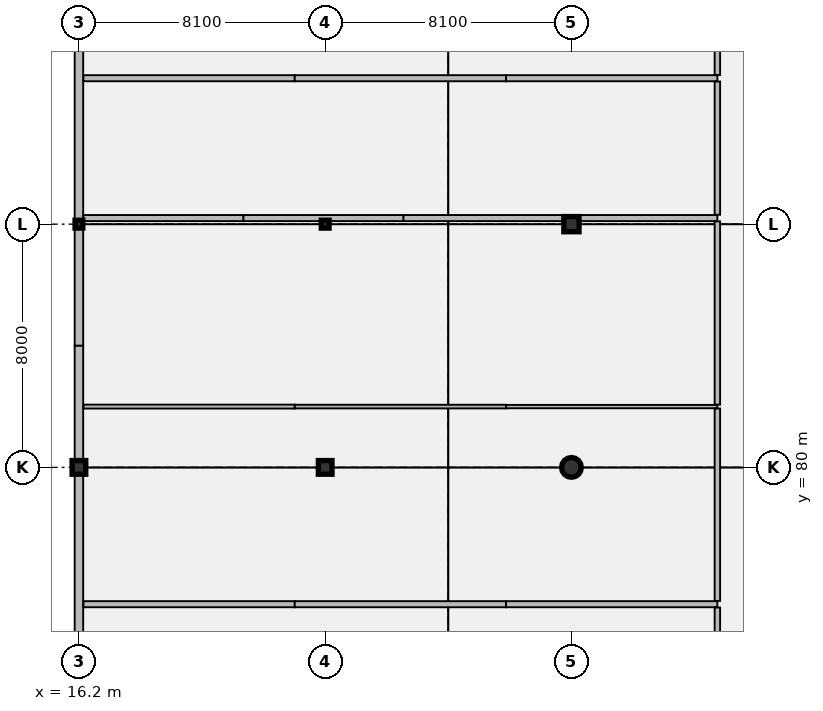
"""IFC4 building model, lengths in metres.
Left out: names, types, materials, properties, quantities, classifications, styles, units other than length and angle.
Written with IfcOpenShell. Run it as: python <this file> out.ifc"""

import sys

from ifc_helpers import new_model, si_unit, direction, frame, frame_2d, origin, origin_2d, place, context, subcontext, project, spatial, rectangle, circle, i_section, extrude, element, fill, save


model = new_model("IFC4")
c1 = context("Model", 3, precision=1e-05, world=origin(), true_north=direction((0.0, 1.0)))
c2 = subcontext(c1, "Body", "Model", "MODEL_VIEW")
j1 = project(units=[si_unit("LENGTHUNIT", "METRE"), si_unit("PLANEANGLEUNIT", "RADIAN")], contexts=[c1])
p1 = place(None, origin())
s1 = spatial("IfcSite", under=j1, at=p1, CompositionType="ELEMENT")
p2 = place(p1, origin())
s2 = spatial("IfcBuilding", under=s1, at=p2, CompositionType="ELEMENT")
p3 = place(p2, frame((0.0, 0.0, 33.3)))
s3 = spatial("IfcBuildingStorey", under=s2, at=p3, CompositionType="ELEMENT", Elevation=33.3)
p4 = place(p3, frame((16.2, 80.0, 0.0), z_axis=(0.0, 0.0, 1.0), x_axis=(1.0, 0.0, 0.0)))
e1 = element("IfcColumn", 1, at=p4, inside=s3, PredefinedType="COLUMN", context=c2, shape_type="SweptSolid", body=[
    extrude(rectangle(XDim=0.45, YDim=0.45, at=origin_2d()), origin(), (0.0, 0.0, 1.0), 3.98),
])
p5 = place(p3, frame((16.2, 88.0, 0.0), z_axis=(0.0, 0.0, 1.0), x_axis=(1.0, 0.0, 0.0)))
e2 = element("IfcColumn", 2, at=p5, inside=s3, PredefinedType="COLUMN", context=c2, shape_type="SweptSolid", body=[
    extrude(i_section(OverallWidth=0.256, OverallDepth=0.26, WebThickness=0.011, FlangeThickness=0.017, FilletRadius=0.013, at=origin_2d()), origin(), (0.0, 0.0, 1.0), 3.98),
])
p6 = place(p3, frame((24.3, 80.0, 0.0), z_axis=(0.0, 0.0, 1.0), x_axis=(1.0, 0.0, 0.0)))
e3 = element("IfcColumn", 3, at=p6, inside=s3, PredefinedType="COLUMN", context=c2, shape_type="SweptSolid", body=[
    extrude(rectangle(XDim=0.45, YDim=0.45, at=origin_2d()), origin(), (0.0, 0.0, 1.0), 3.98),
])
p7 = place(p3, frame((24.3, 88.0, 0.0), z_axis=(0.0, 0.0, 1.0), x_axis=(1.0, 0.0, 0.0)))
e4 = element("IfcColumn", 4, at=p7, inside=s3, PredefinedType="COLUMN", context=c2, shape_type="SweptSolid", body=[
    extrude(i_section(OverallWidth=0.256, OverallDepth=0.26, WebThickness=0.011, FlangeThickness=0.017, FilletRadius=0.013, at=origin_2d()), origin(), (0.0, 0.0, 1.0), 3.98),
])
p8 = place(p3, frame((32.4, 80.0, 0.0), z_axis=(0.0, 0.0, 1.0), x_axis=(1.0, 0.0, 0.0)))
e5 = element("IfcColumn", 5, at=p8, inside=s3, PredefinedType="COLUMN", context=c2, shape_type="SweptSolid", body=[
    extrude(circle(Radius=0.325, at=origin_2d()), origin(), (0.0, 0.0, 1.0), 3.98),
])
p9 = place(p3, frame((32.4, 88.0, 0.0), z_axis=(0.0, 0.0, 1.0), x_axis=(1.0, 0.0, 0.0)))
e6 = element("IfcColumn", 6, at=p9, inside=s3, PredefinedType="COLUMN", context=c2, shape_type="SweptSolid", body=[
    extrude(rectangle(XDim=0.5, YDim=0.5, at=origin_2d()), origin(), (0.0, 0.0, 1.0), 3.98),
])
p10 = place(p3, frame((16.2, 98.0, 0.0), z_axis=(0.0, 0.0, 1.0), x_axis=(0.0, -1.0, 0.0)))
e7 = element("IfcWall", 7, at=p10, inside=s3, PredefinedType="SOLIDWALL", context=c2, shape_type="SweptSolid", body=[
    extrude(rectangle(XDim=14.0, YDim=0.28, at=frame_2d((7.0, 0.0))), origin(), (0.0, 0.0, 1.0), 3.655),
])
p11 = place(p10, frame((6.3, 0.0, 0.95)))
e8 = element("IfcOpeningElement", 8, at=p11, cuts=e7, PredefinedType="OPENING", context=c2, shape_type="SweptSolid", body=[
    extrude(rectangle(XDim=1.8, YDim=1.5, at=frame_2d((0.9, 0.75))), frame((0.0, 0.15, 0.0), z_axis=(0.0, -1.0, 0.0), x_axis=(1.0, 0.0, 0.0)), (0.0, 0.0, 1.0), 0.3),
])
p12 = place(p3, frame((16.2, 84.0, 0.0), z_axis=(0.0, 0.0, 1.0), x_axis=(0.0, -1.0, 0.0)))
e9 = element("IfcWall", 9, at=p12, inside=s3, PredefinedType="SOLIDWALL", context=c2, shape_type="SweptSolid", body=[
    extrude(rectangle(XDim=14.0, YDim=0.28, at=frame_2d((7.0, 0.0))), origin(), (0.0, 0.0, 1.0), 3.655),
])
for number, where, z_axis, x_axis in (
    (10, (16.348, 75.5, 0.0), (0.0, 0.0, 1.0), (1.0, 0.0, 0.0)),
    (11, (23.299, 75.5, 0.0), (0.0, 0.0, 1.0), (1.0, 0.0, 0.0)),
    (12, (30.249, 75.5, 0.0), (0.0, 0.0, 1.0), (1.0, 0.0, 0.0)),
):
    element("IfcWall", number, at=place(p3, frame(where, z_axis=z_axis, x_axis=x_axis)), inside=s3, PredefinedType="PARTITIONING", context=c2, shape_type="SweptSolid", body=[
        extrude(rectangle(XDim=6.951, YDim=0.2, at=frame_2d((3.475, 0.0))), origin(), (0.0, 0.0, 1.0), 3.98),
    ])
p13 = place(p3, frame((16.348, 82.0, 0.0), z_axis=(0.0, 0.0, 1.0), x_axis=(1.0, 0.0, 0.0)))
e13 = element("IfcWall", 13, at=p13, inside=s3, PredefinedType="PARTITIONING", context=c2, shape_type="SweptSolid", body=[
    extrude(rectangle(XDim=6.951, YDim=0.13, at=frame_2d((3.475, 0.0))), origin(), (0.0, 0.0, 1.0), 3.98),
])
p14 = place(p3, frame((23.299, 82.0, 0.0), z_axis=(0.0, 0.0, 1.0), x_axis=(1.0, 0.0, 0.0)))
e14 = element("IfcWall", 14, at=p14, inside=s3, PredefinedType="PARTITIONING", context=c2, shape_type="SweptSolid", body=[
    extrude(rectangle(XDim=6.951, YDim=0.12, at=frame_2d((3.475, 0.0))), origin(), (0.0, 0.0, 1.0), 3.98),
])
p15 = place(p3, frame((30.249, 82.0, 0.0), z_axis=(0.0, 0.0, 1.0), x_axis=(1.0, 0.0, 0.0)))
e15 = element("IfcWall", 15, at=p15, inside=s3, PredefinedType="PARTITIONING", context=c2, shape_type="SweptSolid", body=[
    extrude(rectangle(XDim=6.951, YDim=0.11, at=frame_2d((3.475, 0.0))), origin(), (0.0, 0.0, 1.0), 3.98),
])
p16 = place(p3, frame((16.348, 88.2, 0.0), z_axis=(0.0, 0.0, 1.0), x_axis=(1.0, 0.0, 0.0)))
e16 = element("IfcWall", 16, at=p16, inside=s3, PredefinedType="PARTITIONING", context=c2, shape_type="SweptSolid", body=[
    extrude(rectangle(XDim=5.265, YDim=0.2, at=frame_2d((2.632, 0.0))), origin(), (0.0, 0.0, 1.0), 3.655),
])
p17 = place(p3, frame((21.613, 88.2, 0.0), z_axis=(0.0, 0.0, 1.0), x_axis=(1.0, 0.0, 0.0)))
e17 = element("IfcWall", 17, at=p17, inside=s3, PredefinedType="PARTITIONING", context=c2, shape_type="SweptSolid", body=[
    extrude(rectangle(XDim=5.265, YDim=0.2, at=frame_2d((2.632, 0.0))), origin(), (0.0, 0.0, 1.0), 3.655),
])
p18 = place(p3, frame((26.877, 88.2, 0.0), z_axis=(0.0, 0.0, 1.0), x_axis=(1.0, 0.0, 0.0)))
e18 = element("IfcWall", 18, at=p18, inside=s3, PredefinedType="PARTITIONING", context=c2, shape_type="SweptSolid", body=[
    extrude(rectangle(XDim=5.265, YDim=0.2, at=frame_2d((2.632, 0.0))), origin(), (0.0, 0.0, 1.0), 3.655),
])
p19 = place(p3, frame((32.658, 88.2, 0.0), z_axis=(0.0, 0.0, 1.0), x_axis=(1.0, 0.0, 0.0)))
e19 = element("IfcWall", 19, at=p19, inside=s3, PredefinedType="PARTITIONING", context=c2, shape_type="SweptSolid", body=[
    extrude(rectangle(XDim=4.542, YDim=0.2, at=frame_2d((2.271, 0.0))), origin(), (0.0, 0.0, 1.0), 3.655),
])
for number, where, z_axis, x_axis in (
    (20, (16.348, 92.8, 0.0), (0.0, 0.0, 1.0), (1.0, 0.0, 0.0)),
    (21, (23.299, 92.8, 0.0), (0.0, 0.0, 1.0), (1.0, 0.0, 0.0)),
    (22, (30.249, 92.8, 0.0), (0.0, 0.0, 1.0), (1.0, 0.0, 0.0)),
):
    element("IfcWall", number, at=place(p3, frame(where, z_axis=z_axis, x_axis=x_axis)), inside=s3, PredefinedType="PARTITIONING", context=c2, shape_type="SweptSolid", body=[
        extrude(rectangle(XDim=6.951, YDim=0.2, at=frame_2d((3.475, 0.0))), origin(), (0.0, 0.0, 1.0), 3.98),
    ])
p20 = place(p3, frame((37.2, 73.308, 0.0), z_axis=(0.0, 0.0, 1.0), x_axis=(0.0, 1.0, 0.0)))
e23 = element("IfcWall", 23, at=p20, inside=s3, PredefinedType="PARTITIONING", context=c2, shape_type="SweptSolid", body=[
    extrude(rectangle(XDim=2.084, YDim=0.18, at=frame_2d((1.042, 0.0))), origin(), (0.0, 0.0, 1.0), 3.98),
])
p21 = place(p20, frame((0.492, 0.0, 0.0)))
e24 = element("IfcOpeningElement", 24, at=p21, cuts=e23, PredefinedType="OPENING", context=c2, shape_type="SweptSolid", body=[
    extrude(rectangle(XDim=1.1, YDim=2.2, at=frame_2d((0.55, 1.1))), frame((0.0, 0.1, 0.0), z_axis=(0.0, -1.0, 0.0), x_axis=(1.0, 0.0, 0.0)), (0.0, 0.0, 1.0), 0.2),
])
p22 = place(p3, frame((37.2, 75.608, 0.0), z_axis=(0.0, 0.0, 1.0), x_axis=(0.0, 1.0, 0.0)))
e25 = element("IfcWall", 25, at=p22, inside=s3, PredefinedType="PARTITIONING", context=c2, shape_type="SweptSolid", body=[
    extrude(rectangle(XDim=6.329, YDim=0.18, at=frame_2d((3.165, 0.0))), origin(), (0.0, 0.0, 1.0), 3.98),
])
p23 = place(p22, frame((2.665, 0.0, 0.0)))
e26 = element("IfcOpeningElement", 26, at=p23, cuts=e25, PredefinedType="OPENING", context=c2, shape_type="SweptSolid", body=[
    extrude(rectangle(XDim=1.0, YDim=2.2, at=frame_2d((0.5, 1.1))), frame((0.0, 0.1, 0.0), z_axis=(0.0, -1.0, 0.0), x_axis=(1.0, 0.0, 0.0)), (0.0, 0.0, 1.0), 0.2),
])
p24 = place(p3, frame((37.2, 82.063, 0.0), z_axis=(0.0, 0.0, 1.0), x_axis=(0.0, 1.0, 0.0)))
e27 = element("IfcWall", 27, at=p24, inside=s3, PredefinedType="PARTITIONING", context=c2, shape_type="SweptSolid", body=[
    extrude(rectangle(XDim=6.029, YDim=0.18, at=frame_2d((3.015, 0.0))), origin(), (0.0, 0.0, 1.0), 3.98),
])
p25 = place(p24, frame((2.514, 0.0, 0.0)))
e28 = element("IfcOpeningElement", 28, at=p25, cuts=e27, PredefinedType="OPENING", context=c2, shape_type="SweptSolid", body=[
    extrude(rectangle(XDim=1.0, YDim=2.2, at=frame_2d((0.5, 1.1))), frame((0.0, 0.1, 0.0), z_axis=(0.0, -1.0, 0.0), x_axis=(1.0, 0.0, 0.0)), (0.0, 0.0, 1.0), 0.2),
])
p26 = place(p3, frame((37.2, 88.308, 0.0), z_axis=(0.0, 0.0, 1.0), x_axis=(0.0, 1.0, 0.0)))
e29 = element("IfcWall", 29, at=p26, inside=s3, PredefinedType="PARTITIONING", context=c2, shape_type="SweptSolid", body=[
    extrude(rectangle(XDim=4.384, YDim=0.18, at=frame_2d((2.192, 0.0))), origin(), (0.0, 0.0, 1.0), 3.98),
])
p27 = place(p26, frame((1.642, 0.0, 0.0)))
e30 = element("IfcOpeningElement", 30, at=p27, cuts=e29, PredefinedType="OPENING", context=c2, shape_type="SweptSolid", body=[
    extrude(rectangle(XDim=1.1, YDim=2.2, at=frame_2d((0.55, 1.1))), frame((0.0, 0.1, 0.0), z_axis=(0.0, -1.0, 0.0), x_axis=(1.0, 0.0, 0.0)), (0.0, 0.0, 1.0), 0.2),
])
p28 = place(p3, frame((37.2, 92.908, 0.0), z_axis=(0.0, 0.0, 1.0), x_axis=(0.0, 1.0, 0.0)))
e31 = element("IfcWall", 31, at=p28, inside=s3, PredefinedType="PARTITIONING", context=c2, shape_type="SweptSolid", body=[
    extrude(rectangle(XDim=3.794, YDim=0.18, at=frame_2d((1.897, 0.0))), origin(), (0.0, 0.0, 1.0), 3.98),
])
p29 = place(p28, frame((1.397, 0.0, 0.0)))
e32 = element("IfcOpeningElement", 32, at=p29, cuts=e31, PredefinedType="OPENING", context=c2, shape_type="SweptSolid", body=[
    extrude(rectangle(XDim=1.0, YDim=2.2, at=frame_2d((0.5, 1.1))), frame((0.0, 0.1, 0.0), z_axis=(0.0, -1.0, 0.0), x_axis=(1.0, 0.0, 0.0)), (0.0, 0.0, 1.0), 0.2),
])
p30 = place(p11, origin())
e33 = element("IfcWindow", 33, at=p30, inside=s3, PartitioningType="DOUBLE_PANEL_VERTICAL", PredefinedType="WINDOW", context=c2, shape_type="SweptSolid", body=[
    extrude(rectangle(XDim=1.8, YDim=1.5, at=frame_2d((0.9, 0.75))), frame((0.0, 0.03, 0.0), z_axis=(0.0, -1.0, 0.0), x_axis=(1.0, 0.0, 0.0)), (0.0, 0.0, 1.0), 0.06),
])
fill(e8, e33)
p31 = place(p21, origin())
e34 = element("IfcDoor", 34, at=p31, inside=s3, OperationType="SINGLE_SWING_LEFT", PredefinedType="DOOR", context=c2, shape_type="SweptSolid", body=[
    extrude(rectangle(XDim=1.1, YDim=2.2, at=frame_2d((0.55, 1.1))), frame((0.0, 0.025, 0.0), z_axis=(0.0, -1.0, 0.0), x_axis=(1.0, 0.0, 0.0)), (0.0, 0.0, 1.0), 0.05),
])
fill(e24, e34)
p32 = place(p23, origin())
e35 = element("IfcDoor", 35, at=p32, inside=s3, OperationType="SINGLE_SWING_RIGHT", PredefinedType="DOOR", context=c2, shape_type="SweptSolid", body=[
    extrude(rectangle(XDim=1.0, YDim=2.2, at=frame_2d((0.5, 1.1))), frame((0.0, 0.025, 0.0), z_axis=(0.0, -1.0, 0.0), x_axis=(1.0, 0.0, 0.0)), (0.0, 0.0, 1.0), 0.05),
])
fill(e26, e35)
p33 = place(p25, origin())
e36 = element("IfcDoor", 36, at=p33, inside=s3, OperationType="SINGLE_SWING_LEFT", PredefinedType="DOOR", context=c2, shape_type="SweptSolid", body=[
    extrude(rectangle(XDim=1.0, YDim=2.2, at=frame_2d((0.5, 1.1))), frame((0.0, 0.025, 0.0), z_axis=(0.0, -1.0, 0.0), x_axis=(1.0, 0.0, 0.0)), (0.0, 0.0, 1.0), 0.05),
])
fill(e28, e36)
p34 = place(p27, origin())
e37 = element("IfcDoor", 37, at=p34, inside=s3, OperationType="SINGLE_SWING_RIGHT", PredefinedType="DOOR", context=c2, shape_type="SweptSolid", body=[
    extrude(rectangle(XDim=1.1, YDim=2.2, at=frame_2d((0.55, 1.1))), frame((0.0, 0.025, 0.0), z_axis=(0.0, -1.0, 0.0), x_axis=(1.0, 0.0, 0.0)), (0.0, 0.0, 1.0), 0.05),
])
fill(e30, e37)
save(model, sys.argv[1])
